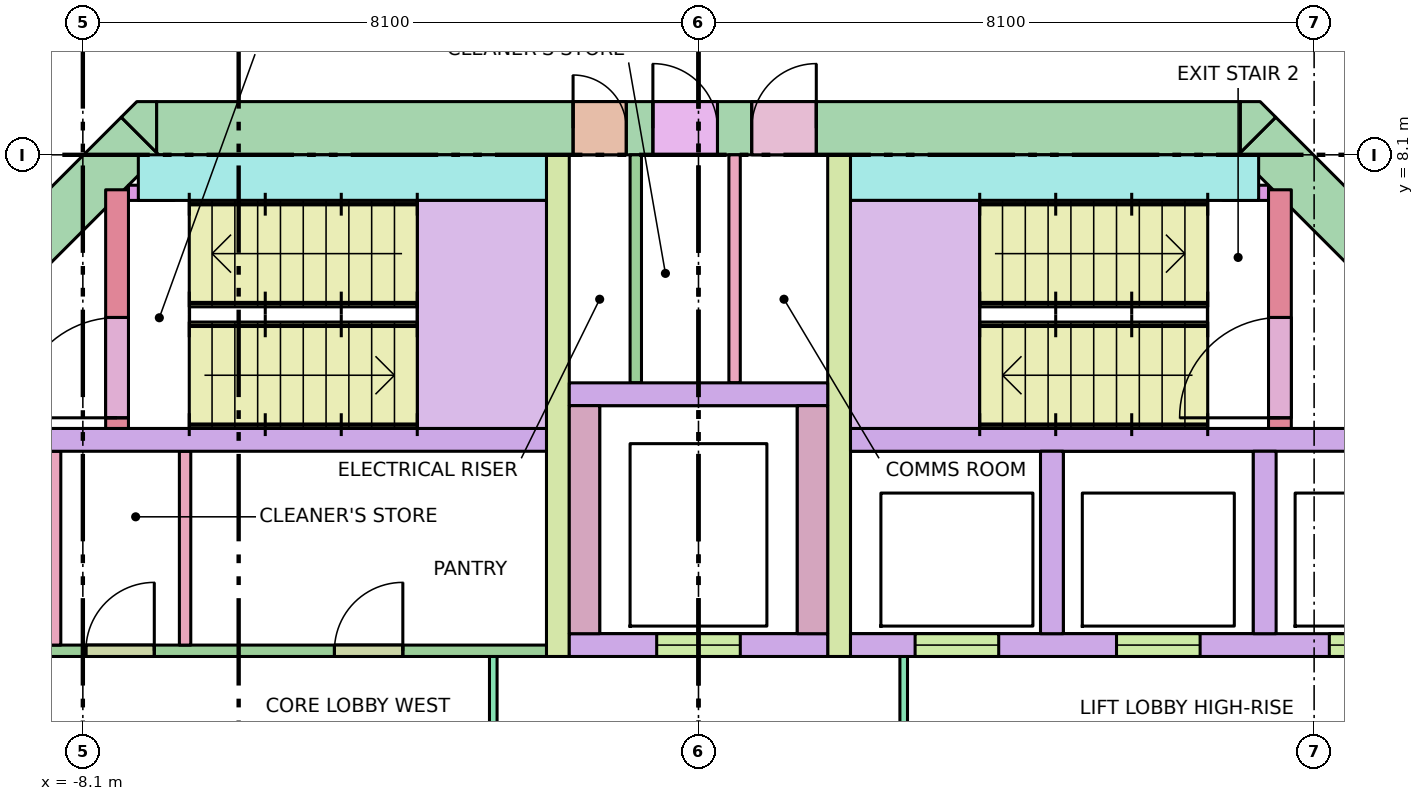
"""IFC4 building model, lengths in metres.
Left out: names, types, materials, properties, quantities, classifications, styles, units other than length and angle.
Written with IfcOpenShell. Run it as: python <this file> out.ifc"""

import sys

from ifc_helpers import new_model, si_unit, direction, frame, frame_2d, origin, place, context, subcontext, project, spatial, polyline, rectangle, outline, extrude, element, fill, save


model = new_model("IFC4")
c1 = context("Model", 3, precision=1e-05, world=origin(), true_north=direction((0.0, 1.0)))
c2 = subcontext(c1, "Body", "Model", "MODEL_VIEW")
j1 = project(units=[si_unit("LENGTHUNIT", "METRE"), si_unit("PLANEANGLEUNIT", "RADIAN")], contexts=[c1])
p1 = place(None, origin())
s1 = spatial("IfcSite", under=j1, at=p1, CompositionType="ELEMENT")
p2 = place(p1, origin())
s2 = spatial("IfcBuilding", under=s1, at=p2, CompositionType="ELEMENT")
p3 = place(p2, frame((0.0, 0.0, 203.9)))
s3 = spatial("IfcBuildingStorey", under=s2, at=p3, CompositionType="ELEMENT", Elevation=203.9)
p4 = place(p3, frame((-7.13, 8.45, -0.28), z_axis=(0.0, 0.0, 1.0), x_axis=(1.0, 0.0, 0.0)))
e1 = element("IfcWall", 1, at=p4, inside=s3, PredefinedType="SHEAR", context=c2, shape_type="SweptSolid", body=[
    extrude(rectangle(XDim=14.26, YDim=0.7, at=frame_2d((7.13, 0.0))), origin(), (0.0, 0.0, 1.0), 3.7),
])
p5 = place(p4, frame((5.48, 0.0, 0.28)))
e2 = element("IfcOpeningElement", 2, at=p5, cuts=e1, PredefinedType="OPENING", context=c2, shape_type="SweptSolid", body=[
    extrude(rectangle(XDim=0.7, YDim=2.1, at=frame_2d((0.35, 1.05))), frame((0.0, 0.36, 0.0), z_axis=(0.0, -1.0, 0.0), x_axis=(1.0, 0.0, 0.0)), (0.0, 0.0, 1.0), 0.72),
])
p6 = place(p4, frame((6.53, 0.0, 0.28)))
e3 = element("IfcOpeningElement", 3, at=p6, cuts=e1, PredefinedType="OPENING", context=c2, shape_type="SweptSolid", body=[
    extrude(rectangle(XDim=0.85, YDim=2.1, at=frame_2d((0.425, 1.05))), frame((0.0, 0.36, 0.0), z_axis=(0.0, -1.0, 0.0), x_axis=(1.0, 0.0, 0.0)), (0.0, 0.0, 1.0), 0.72),
])
p7 = place(p4, frame((7.83, 0.0, 0.28)))
e4 = element("IfcOpeningElement", 4, at=p7, cuts=e1, PredefinedType="OPENING", context=c2, shape_type="SweptSolid", body=[
    extrude(rectangle(XDim=0.85, YDim=2.1, at=frame_2d((0.425, 1.05))), frame((0.0, 0.36, 0.0), z_axis=(0.0, -1.0, 0.0), x_axis=(1.0, 0.0, 0.0)), (0.0, 0.0, 1.0), 0.72),
])
p8 = place(p3, frame((-10.347, 5.347, -0.28), z_axis=(0.0, 0.0, 1.0), x_axis=(0.707106781187, 0.707106781187, 0.0)))
e5 = element("IfcWall", 5, at=p8, inside=s3, PredefinedType="SHEAR", context=c2, shape_type="SweptSolid", body=[
    extrude(rectangle(XDim=4.243, YDim=0.7, at=frame_2d((2.121, 0.0))), origin(), (0.0, 0.0, 1.0), 3.7),
])
p9 = place(p8, frame((0.65, 0.0, 0.28)))
e6 = element("IfcOpeningElement", 6, at=p9, cuts=e5, PredefinedType="OPENING", context=c2, shape_type="SweptSolid", body=[
    extrude(rectangle(XDim=1.2, YDim=2.1, at=frame_2d((0.6, 1.05))), frame((0.0, 0.36, 0.0), z_axis=(0.0, -1.0, 0.0), x_axis=(1.0, 0.0, 0.0)), (0.0, 0.0, 1.0), 0.72),
])
p10 = place(p3, frame((7.347, 8.347, -0.28), z_axis=(0.0, 0.0, 1.0), x_axis=(0.707106781187, -0.707106781187, 0.0)))
e7 = element("IfcWall", 7, at=p10, inside=s3, PredefinedType="SHEAR", context=c2, shape_type="SweptSolid", body=[
    extrude(rectangle(XDim=4.243, YDim=0.7, at=frame_2d((2.121, 0.0))), origin(), (0.0, 0.0, 1.0), 3.7),
])
p11 = place(p10, frame((2.393, 0.0, 0.28)))
e8 = element("IfcOpeningElement", 8, at=p11, cuts=e7, PredefinedType="OPENING", context=c2, shape_type="SweptSolid", body=[
    extrude(rectangle(XDim=1.2, YDim=2.1, at=frame_2d((0.6, 1.05))), frame((0.0, 0.36, 0.0), z_axis=(0.0, -1.0, 0.0), x_axis=(1.0, 0.0, 0.0)), (0.0, 0.0, 1.0), 0.72),
])
p12 = place(p3, frame((0.0, 0.0, -0.28)))
e9 = element("IfcWall", 9, at=p12, inside=s3, PredefinedType="SHEAR", context=c2, shape_type="SweptSolid", body=[
    extrude(outline(polyline([(-7.39, 8.8), (-7.13, 8.8), (-7.13, 8.8), (-7.13, 8.13), (-7.595, 8.595), (-7.595, 8.595), (-7.595, 8.595), (-7.39, 8.8)])), origin(), (0.0, 0.0, 1.0), 3.7),
])
p13 = place(p3, frame((0.0, 0.0, -0.28)))
e10 = element("IfcWall", 10, at=p13, inside=s3, PredefinedType="SHEAR", context=c2, shape_type="SweptSolid", body=[
    extrude(outline(polyline([(7.39, 8.8), (7.595, 8.595), (7.595, 8.595), (7.595, 8.595), (7.13, 8.13), (7.13, 8.8), (7.13, 8.8), (7.39, 8.8)])), origin(), (0.0, 0.0, 1.0), 3.7),
])
for number, where, z_axis, x_axis in (
    (11, (-10.1, 4.35, 0.0), (0.0, 0.0, 1.0), (1.0, 0.0, 0.0)),
    (12, (2.0, 4.35, 0.0), (0.0, 0.0, 1.0), (1.0, 0.0, 0.0)),
):
    element("IfcWall", number, at=place(p3, frame(where, z_axis=z_axis, x_axis=x_axis)), inside=s3, PredefinedType="SOLIDWALL", context=c2, shape_type="SweptSolid", body=[
        extrude(rectangle(XDim=8.1, YDim=0.3, at=frame_2d((4.05, 0.0))), origin(), (0.0, 0.0, 1.0), 3.42),
    ])
p14 = place(p3, frame((2.0, 1.65, 0.0), z_axis=(0.0, 0.0, 1.0), x_axis=(1.0, 0.0, 0.0)))
e13 = element("IfcWall", 13, at=p14, inside=s3, PredefinedType="SOLIDWALL", context=c2, shape_type="SweptSolid", body=[
    extrude(rectangle(XDim=8.1, YDim=0.3, at=frame_2d((4.05, 0.0))), origin(), (0.0, 0.0, 1.0), 3.42),
])
p15 = place(p14, frame((0.85, 0.0, 0.0)))
e14 = element("IfcOpeningElement", 14, at=p15, cuts=e13, PredefinedType="OPENING", context=c2, shape_type="SweptSolid", body=[
    extrude(rectangle(XDim=1.1, YDim=2.1, at=frame_2d((0.55, 1.05))), frame((0.0, 0.16, 0.0), z_axis=(0.0, -1.0, 0.0), x_axis=(1.0, 0.0, 0.0)), (0.0, 0.0, 1.0), 0.32),
])
p16 = place(p14, frame((3.5, 0.0, 0.0)))
e15 = element("IfcOpeningElement", 15, at=p16, cuts=e13, PredefinedType="OPENING", context=c2, shape_type="SweptSolid", body=[
    extrude(rectangle(XDim=1.1, YDim=2.1, at=frame_2d((0.55, 1.05))), frame((0.0, 0.16, 0.0), z_axis=(0.0, -1.0, 0.0), x_axis=(1.0, 0.0, 0.0)), (0.0, 0.0, 1.0), 0.32),
])
p17 = place(p14, frame((6.3, 0.0, 0.0)))
e16 = element("IfcOpeningElement", 16, at=p17, cuts=e13, PredefinedType="OPENING", context=c2, shape_type="SweptSolid", body=[
    extrude(rectangle(XDim=1.1, YDim=2.1, at=frame_2d((0.55, 1.05))), frame((0.0, 0.16, 0.0), z_axis=(0.0, -1.0, 0.0), x_axis=(1.0, 0.0, 0.0)), (0.0, 0.0, 1.0), 0.32),
])
for number, where, z_axis, x_axis in (
    (17, (4.65, 1.8, 0.0), (0.0, 0.0, 1.0), (0.0, 1.0, 0.0)),
    (18, (7.45, 1.8, 0.0), (0.0, 0.0, 1.0), (0.0, 1.0, 0.0)),
):
    element("IfcWall", number, at=place(p3, frame(where, z_axis=z_axis, x_axis=x_axis)), inside=s3, PredefinedType="SOLIDWALL", context=c2, shape_type="SweptSolid", body=[
        extrude(rectangle(XDim=2.4, YDim=0.3, at=frame_2d((1.2, 0.0))), origin(), (0.0, 0.0, 1.0), 3.42),
    ])
for number, where, z_axis, x_axis in (
    (19, (-1.85, 1.5, 0.0), (0.0, 0.0, 1.0), (0.0, 1.0, 0.0)),
    (20, (1.85, 1.5, 0.0), (0.0, 0.0, 1.0), (0.0, 1.0, 0.0)),
):
    element("IfcWall", number, at=place(p3, frame(where, z_axis=z_axis, x_axis=x_axis)), inside=s3, PredefinedType="SHEAR", context=c2, shape_type="SweptSolid", body=[
        extrude(rectangle(XDim=6.6, YDim=0.3, at=frame_2d((3.3, 0.0))), origin(), (0.0, 0.0, 1.0), 3.42),
    ])
p18 = place(p3, frame((-1.7, 1.65, 0.0), z_axis=(0.0, 0.0, 1.0), x_axis=(1.0, 0.0, 0.0)))
e21 = element("IfcWall", 21, at=p18, inside=s3, PredefinedType="SOLIDWALL", context=c2, shape_type="SweptSolid", body=[
    extrude(rectangle(XDim=3.4, YDim=0.3, at=frame_2d((1.7, 0.0))), origin(), (0.0, 0.0, 1.0), 3.42),
])
p19 = place(p18, frame((1.15, 0.0, 0.0)))
e22 = element("IfcOpeningElement", 22, at=p19, cuts=e21, PredefinedType="OPENING", context=c2, shape_type="SweptSolid", body=[
    extrude(rectangle(XDim=1.1, YDim=2.1, at=frame_2d((0.55, 1.05))), frame((0.0, 0.16, 0.0), z_axis=(0.0, -1.0, 0.0), x_axis=(1.0, 0.0, 0.0)), (0.0, 0.0, 1.0), 0.32),
])
for number, where, z_axis, x_axis in (
    (23, (-1.5, 1.8, 0.0), (0.0, 0.0, 1.0), (0.0, 1.0, 0.0)),
    (24, (1.5, 1.8, 0.0), (0.0, 0.0, 1.0), (0.0, 1.0, 0.0)),
):
    element("IfcWall", number, at=place(p3, frame(where, z_axis=z_axis, x_axis=x_axis)), inside=s3, PredefinedType="SOLIDWALL", context=c2, shape_type="SweptSolid", body=[
        extrude(rectangle(XDim=3.0, YDim=0.4, at=frame_2d((1.5, 0.0))), origin(), (0.0, 0.0, 1.0), 3.42),
    ])
p20 = place(p3, frame((-1.7, 4.95, 0.0), z_axis=(0.0, 0.0, 1.0), x_axis=(1.0, 0.0, 0.0)))
e25 = element("IfcWall", 25, at=p20, inside=s3, PredefinedType="SOLIDWALL", context=c2, shape_type="SweptSolid", body=[
    extrude(rectangle(XDim=3.4, YDim=0.3, at=frame_2d((1.7, 0.0))), origin(), (0.0, 0.0, 1.0), 3.42),
])
p21 = place(p3, frame((-7.65, 4.5, 0.0), z_axis=(0.0, 0.0, 1.0), x_axis=(0.0, 1.0, 0.0)))
e26 = element("IfcWall", 26, at=p21, inside=s3, PredefinedType="SHEAR", context=c2, shape_type="SweptSolid", body=[
    extrude(rectangle(XDim=3.14, YDim=0.3, at=frame_2d((1.57, 0.0))), origin(), (0.0, 0.0, 1.0), 3.42),
])
p22 = place(p21, frame((0.14, 0.0, 0.0)))
e27 = element("IfcOpeningElement", 27, at=p22, cuts=e26, PredefinedType="OPENING", context=c2, shape_type="SweptSolid", body=[
    extrude(rectangle(XDim=1.32, YDim=2.1, at=frame_2d((0.66, 1.05))), frame((0.0, 0.16, 0.0), z_axis=(0.0, -1.0, 0.0), x_axis=(1.0, 0.0, 0.0)), (0.0, 0.0, 1.0), 0.32),
])
p23 = place(p3, frame((-7.37, 7.8, 0.0), z_axis=(0.0, 0.0, 1.0), x_axis=(1.0, 0.0, 0.0)))
e28 = element("IfcWall", 28, at=p23, inside=s3, PredefinedType="SHEAR", context=c2, shape_type="SweptSolid", body=[
    extrude(rectangle(XDim=5.37, YDim=0.6, at=frame_2d((2.685, 0.0))), origin(), (0.0, 0.0, 1.0), 3.42),
])
p24 = place(p3, frame((7.65, 4.5, 0.0), z_axis=(0.0, 0.0, 1.0), x_axis=(0.0, 1.0, 0.0)))
e29 = element("IfcWall", 29, at=p24, inside=s3, PredefinedType="SHEAR", context=c2, shape_type="SweptSolid", body=[
    extrude(rectangle(XDim=3.14, YDim=0.3, at=frame_2d((1.57, 0.0))), origin(), (0.0, 0.0, 1.0), 3.42),
])
p25 = place(p24, frame((0.14, 0.0, 0.0)))
e30 = element("IfcOpeningElement", 30, at=p25, cuts=e29, PredefinedType="OPENING", context=c2, shape_type="SweptSolid", body=[
    extrude(rectangle(XDim=1.32, YDim=2.1, at=frame_2d((0.66, 1.05))), frame((0.0, 0.16, 0.0), z_axis=(0.0, -1.0, 0.0), x_axis=(1.0, 0.0, 0.0)), (0.0, 0.0, 1.0), 0.32),
])
p26 = place(p3, frame((2.0, 7.8, 0.0), z_axis=(0.0, 0.0, 1.0), x_axis=(1.0, 0.0, 0.0)))
e31 = element("IfcWall", 31, at=p26, inside=s3, PredefinedType="SHEAR", context=c2, shape_type="SweptSolid", body=[
    extrude(rectangle(XDim=5.37, YDim=0.6, at=frame_2d((2.685, 0.0))), origin(), (0.0, 0.0, 1.0), 3.42),
])
for number, where, z_axis, x_axis in (
    (32, (-7.5, 7.6, 0.0), (0.0, 0.0, 1.0), (1.0, 0.0, 0.0)),
    (33, (6.9, 7.6, 0.0), (0.0, 0.0, 1.0), (1.0, 0.0, 0.0)),
):
    element("IfcWall", number, at=place(p3, frame(where, z_axis=z_axis, x_axis=x_axis)), inside=s3, PredefinedType="SHEAR", context=c2, shape_type="SweptSolid", body=[
        extrude(rectangle(XDim=0.6, YDim=0.2, at=frame_2d((0.3, 0.0))), origin(), (0.0, 0.0, 1.0), 3.42),
    ])
p27 = place(p3, frame((-2.7, -1.5, 0.0), z_axis=(0.0, 0.0, 1.0), x_axis=(0.0, 1.0, 0.0)))
e34 = element("IfcWall", 34, at=p27, inside=s3, PredefinedType="PARTITIONING", context=c2, shape_type="SweptSolid", body=[
    extrude(rectangle(XDim=3.0, YDim=0.1, at=frame_2d((1.5, 0.0))), origin(), (0.0, 0.0, 1.0), 3.42),
])
p28 = place(p27, frame((0.9, 0.0, 0.0)))
e35 = element("IfcOpeningElement", 35, at=p28, cuts=e34, PredefinedType="OPENING", context=c2, shape_type="SweptSolid", body=[
    extrude(rectangle(XDim=1.2, YDim=2.1, at=frame_2d((0.6, 1.05))), frame((0.0, 0.06, 0.0), z_axis=(0.0, -1.0, 0.0), x_axis=(1.0, 0.0, 0.0)), (0.0, 0.0, 1.0), 0.12),
])
p29 = place(p3, frame((2.7, -1.5, 0.0), z_axis=(0.0, 0.0, 1.0), x_axis=(0.0, 1.0, 0.0)))
e36 = element("IfcWall", 36, at=p29, inside=s3, PredefinedType="PARTITIONING", context=c2, shape_type="SweptSolid", body=[
    extrude(rectangle(XDim=3.0, YDim=0.1, at=frame_2d((1.5, 0.0))), origin(), (0.0, 0.0, 1.0), 3.42),
])
p30 = place(p29, frame((0.9, 0.0, 0.0)))
e37 = element("IfcOpeningElement", 37, at=p30, cuts=e36, PredefinedType="OPENING", context=c2, shape_type="SweptSolid", body=[
    extrude(rectangle(XDim=1.2, YDim=2.1, at=frame_2d((0.6, 1.05))), frame((0.0, 0.06, 0.0), z_axis=(0.0, -1.0, 0.0), x_axis=(1.0, 0.0, 0.0)), (0.0, 0.0, 1.0), 0.12),
])
for number, where, z_axis, x_axis in (
    (38, (-0.825, 5.1, 0.0), (0.0, 0.0, 1.0), (0.0, 1.0, 0.0)),
    (39, (0.475, 5.1, 0.0), (0.0, 0.0, 1.0), (0.0, 1.0, 0.0)),
):
    element("IfcWall", number, at=place(p3, frame(where, z_axis=z_axis, x_axis=x_axis)), inside=s3, PredefinedType="PARTITIONING", context=c2, shape_type="SweptSolid", body=[
        extrude(rectangle(XDim=3.0, YDim=0.15, at=frame_2d((1.5, 0.0))), origin(), (0.0, 0.0, 1.0), 3.42),
    ])
for number, where, z_axis, x_axis in (
    (40, (-8.465, 1.65, 0.0), (0.0, 0.0, 1.0), (0.0, 1.0, 0.0)),
    (41, (-6.755, 1.65, 0.0), (0.0, 0.0, 1.0), (0.0, 1.0, 0.0)),
):
    element("IfcWall", number, at=place(p3, frame(where, z_axis=z_axis, x_axis=x_axis)), inside=s3, PredefinedType="PARTITIONING", context=c2, shape_type="SweptSolid", body=[
        extrude(rectangle(XDim=2.55, YDim=0.15, at=frame_2d((1.275, 0.0))), origin(), (0.0, 0.0, 1.0), 3.42),
    ])
p31 = place(p3, frame((-10.1, 1.575, 0.0), z_axis=(0.0, 0.0, 1.0), x_axis=(1.0, 0.0, 0.0)))
e42 = element("IfcWall", 42, at=p31, inside=s3, PredefinedType="PARTITIONING", context=c2, shape_type="SweptSolid", body=[
    extrude(rectangle(XDim=8.1, YDim=0.15, at=frame_2d((4.05, 0.0))), origin(), (0.0, 0.0, 1.0), 3.42),
])
p32 = place(p31, frame((0.33, 0.0, 0.0)))
e43 = element("IfcOpeningElement", 43, at=p32, cuts=e42, PredefinedType="OPENING", context=c2, shape_type="SweptSolid", body=[
    extrude(rectangle(XDim=0.9, YDim=2.1, at=frame_2d((0.45, 1.05))), frame((0.0, 0.085, 0.0), z_axis=(0.0, -1.0, 0.0), x_axis=(1.0, 0.0, 0.0)), (0.0, 0.0, 1.0), 0.17),
])
p33 = place(p31, frame((2.04, 0.0, 0.0)))
e44 = element("IfcOpeningElement", 44, at=p33, cuts=e42, PredefinedType="OPENING", context=c2, shape_type="SweptSolid", body=[
    extrude(rectangle(XDim=0.9, YDim=2.1, at=frame_2d((0.45, 1.05))), frame((0.0, 0.085, 0.0), z_axis=(0.0, -1.0, 0.0), x_axis=(1.0, 0.0, 0.0)), (0.0, 0.0, 1.0), 0.17),
])
p34 = place(p31, frame((5.31, 0.0, 0.0)))
e45 = element("IfcOpeningElement", 45, at=p34, cuts=e42, PredefinedType="OPENING", context=c2, shape_type="SweptSolid", body=[
    extrude(rectangle(XDim=0.9, YDim=2.1, at=frame_2d((0.45, 1.05))), frame((0.0, 0.085, 0.0), z_axis=(0.0, -1.0, 0.0), x_axis=(1.0, 0.0, 0.0)), (0.0, 0.0, 1.0), 0.17),
])
p35 = place(p3, frame((-11.945, 6.896, 0.0), z_axis=(0.0, 0.0, 1.0), x_axis=(0.707106781187, 0.707106781187, 0.0)))
e46 = element("IfcWall", 46, at=p35, inside=s3, PredefinedType="PARTITIONING", context=c2, shape_type="SweptSolid", body=[
    extrude(rectangle(XDim=5.291, YDim=0.15, at=frame_2d((2.646, 0.0))), origin(), (0.0, 0.0, 1.0), 2.62),
])
p36 = place(p35, frame((3.956, 0.0, 0.0)))
e47 = element("IfcOpeningElement", 47, at=p36, cuts=e46, PredefinedType="OPENING", context=c2, shape_type="SweptSolid", body=[
    extrude(rectangle(XDim=0.9, YDim=2.1, at=frame_2d((0.45, 1.05))), frame((0.0, 0.085, 0.0), z_axis=(0.0, -1.0, 0.0), x_axis=(1.0, 0.0, 0.0)), (0.0, 0.0, 1.0), 0.17),
])
p37 = place(p35, frame((1.36, 0.0, 0.0)))
e48 = element("IfcOpeningElement", 48, at=p37, cuts=e46, PredefinedType="OPENING", context=c2, shape_type="SweptSolid", body=[
    extrude(rectangle(XDim=0.9, YDim=2.1, at=frame_2d((0.45, 1.05))), frame((0.0, 0.085, 0.0), z_axis=(0.0, -1.0, 0.0), x_axis=(1.0, 0.0, 0.0)), (0.0, 0.0, 1.0), 0.17),
])
p38 = place(p3, frame((8.204, 10.638, 0.0), z_axis=(0.0, 0.0, 1.0), x_axis=(0.707106781187, -0.707106781187, 0.0)))
e49 = element("IfcWall", 49, at=p38, inside=s3, PredefinedType="PARTITIONING", context=c2, shape_type="SweptSolid", body=[
    extrude(rectangle(XDim=6.271, YDim=0.15, at=frame_2d((3.135, 0.0))), origin(), (0.0, 0.0, 1.0), 2.62),
])
p39 = place(p15, origin())
e50 = element("IfcDoor", 50, at=p39, inside=s3, OperationType="DOUBLE_DOOR_SLIDING", PredefinedType="DOOR", context=c2, shape_type="SweptSolid", body=[
    extrude(rectangle(XDim=1.1, YDim=2.1, at=frame_2d((0.55, 1.05))), frame((0.0, 0.025, 0.0), z_axis=(0.0, -1.0, 0.0), x_axis=(1.0, 0.0, 0.0)), (0.0, 0.0, 1.0), 0.05),
])
fill(e14, e50)
p40 = place(p16, origin())
e51 = element("IfcDoor", 51, at=p40, inside=s3, OperationType="DOUBLE_DOOR_SLIDING", PredefinedType="DOOR", context=c2, shape_type="SweptSolid", body=[
    extrude(rectangle(XDim=1.1, YDim=2.1, at=frame_2d((0.55, 1.05))), frame((0.0, 0.025, 0.0), z_axis=(0.0, -1.0, 0.0), x_axis=(1.0, 0.0, 0.0)), (0.0, 0.0, 1.0), 0.05),
])
fill(e15, e51)
p41 = place(p17, origin())
e52 = element("IfcDoor", 52, at=p41, inside=s3, OperationType="DOUBLE_DOOR_SLIDING", PredefinedType="DOOR", context=c2, shape_type="SweptSolid", body=[
    extrude(rectangle(XDim=1.1, YDim=2.1, at=frame_2d((0.55, 1.05))), frame((0.0, 0.025, 0.0), z_axis=(0.0, -1.0, 0.0), x_axis=(1.0, 0.0, 0.0)), (0.0, 0.0, 1.0), 0.05),
])
fill(e16, e52)
p42 = place(p19, origin())
e53 = element("IfcDoor", 53, at=p42, inside=s3, OperationType="DOUBLE_DOOR_SLIDING", PredefinedType="DOOR", context=c2, shape_type="SweptSolid", body=[
    extrude(rectangle(XDim=1.1, YDim=2.1, at=frame_2d((0.55, 1.05))), frame((0.0, 0.025, 0.0), z_axis=(0.0, -1.0, 0.0), x_axis=(1.0, 0.0, 0.0)), (0.0, 0.0, 1.0), 0.05),
])
fill(e22, e53)
p43 = place(p22, origin())
e54 = element("IfcDoor", 54, at=p43, inside=s3, OperationType="DOUBLE_DOOR_SINGLE_SWING", PredefinedType="DOOR", context=c2, shape_type="SweptSolid", body=[
    extrude(rectangle(XDim=1.32, YDim=2.1, at=frame_2d((0.66, 1.05))), frame((0.0, 0.025, 0.0), z_axis=(0.0, -1.0, 0.0), x_axis=(1.0, 0.0, 0.0)), (0.0, 0.0, 1.0), 0.05),
])
fill(e27, e54)
p44 = place(p25, origin())
e55 = element("IfcDoor", 55, at=p44, inside=s3, OperationType="DOUBLE_DOOR_SINGLE_SWING", PredefinedType="DOOR", context=c2, shape_type="SweptSolid", body=[
    extrude(rectangle(XDim=1.32, YDim=2.1, at=frame_2d((0.66, 1.05))), frame((0.0, 0.025, 0.0), z_axis=(0.0, -1.0, 0.0), x_axis=(1.0, 0.0, 0.0)), (0.0, 0.0, 1.0), 0.05),
])
fill(e30, e55)
p45 = place(p5, origin())
e56 = element("IfcDoor", 56, at=p45, inside=s3, OperationType="SINGLE_SWING_LEFT", PredefinedType="DOOR", context=c2, shape_type="SweptSolid", body=[
    extrude(rectangle(XDim=0.7, YDim=2.1, at=frame_2d((0.35, 1.05))), frame((0.0, 0.025, 0.0), z_axis=(0.0, -1.0, 0.0), x_axis=(1.0, 0.0, 0.0)), (0.0, 0.0, 1.0), 0.05),
])
fill(e2, e56)
p46 = place(p6, origin())
e57 = element("IfcDoor", 57, at=p46, inside=s3, OperationType="SINGLE_SWING_LEFT", PredefinedType="DOOR", context=c2, shape_type="SweptSolid", body=[
    extrude(rectangle(XDim=0.85, YDim=2.1, at=frame_2d((0.425, 1.05))), frame((0.0, 0.025, 0.0), z_axis=(0.0, -1.0, 0.0), x_axis=(1.0, 0.0, 0.0)), (0.0, 0.0, 1.0), 0.05),
])
fill(e3, e57)
p47 = place(p7, origin())
e58 = element("IfcDoor", 58, at=p47, inside=s3, OperationType="SINGLE_SWING_RIGHT", PredefinedType="DOOR", context=c2, shape_type="SweptSolid", body=[
    extrude(rectangle(XDim=0.85, YDim=2.1, at=frame_2d((0.425, 1.05))), frame((0.0, 0.025, 0.0), z_axis=(0.0, -1.0, 0.0), x_axis=(1.0, 0.0, 0.0)), (0.0, 0.0, 1.0), 0.05),
])
fill(e4, e58)
p48 = place(p33, origin())
e59 = element("IfcDoor", 59, at=p48, inside=s3, OperationType="SINGLE_SWING_RIGHT", PredefinedType="DOOR", context=c2, shape_type="SweptSolid", body=[
    extrude(rectangle(XDim=0.9, YDim=2.1, at=frame_2d((0.45, 1.05))), frame((0.0, 0.025, 0.0), z_axis=(0.0, -1.0, 0.0), x_axis=(1.0, 0.0, 0.0)), (0.0, 0.0, 1.0), 0.05),
])
fill(e44, e59)
p49 = place(p34, origin())
e60 = element("IfcDoor", 60, at=p49, inside=s3, OperationType="SINGLE_SWING_RIGHT", PredefinedType="DOOR", context=c2, shape_type="SweptSolid", body=[
    extrude(rectangle(XDim=0.9, YDim=2.1, at=frame_2d((0.45, 1.05))), frame((0.0, 0.025, 0.0), z_axis=(0.0, -1.0, 0.0), x_axis=(1.0, 0.0, 0.0)), (0.0, 0.0, 1.0), 0.05),
])
fill(e45, e60)
save(model, sys.argv[1])
